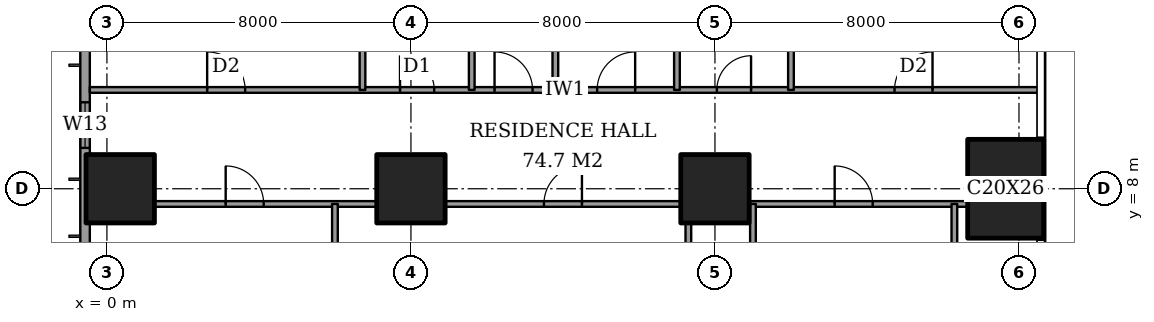
"""IFC4 building model, lengths in metres.
Left out: names, types, materials, properties, quantities, classifications, styles, units other than length and angle.
Written with IfcOpenShell. Run it as: python <this file> out.ifc"""

import sys

from ifc_helpers import new_model, si_unit, direction, frame, frame_2d, origin, origin_2d, place, context, subcontext, project, spatial, rectangle, extrude, element, fill, save


model = new_model("IFC4")
c1 = context("Model", 3, precision=1e-05, world=origin(), true_north=direction((0.0, 1.0)))
c2 = subcontext(c1, "Body", "Model", "MODEL_VIEW")
j1 = project(units=[si_unit("LENGTHUNIT", "METRE"), si_unit("PLANEANGLEUNIT", "RADIAN")], contexts=[c1])
p1 = place(None, origin())
s1 = spatial("IfcSite", under=j1, at=p1, CompositionType="ELEMENT")
p2 = place(p1, origin())
s2 = spatial("IfcBuilding", under=s1, at=p2, CompositionType="ELEMENT")
p3 = place(p2, frame((0.0, 0.0, 185.8)))
s3 = spatial("IfcBuildingStorey", under=s2, at=p3, CompositionType="ELEMENT", Elevation=185.8)
for number, where, z_axis, x_axis in (
    (1, (0.35, 8.0, 0.0), (0.0, 0.0, 1.0), (1.0, 0.0, 0.0)),
    (2, (8.0, 8.0, 0.0), (0.0, 0.0, 1.0), (1.0, 0.0, 0.0)),
    (3, (16.0, 8.0, 0.0), (0.0, 0.0, 1.0), (1.0, 0.0, 0.0)),
):
    element("IfcColumn", number, at=place(p3, frame(where, z_axis=z_axis, x_axis=x_axis)), inside=s3, PredefinedType="COLUMN", context=c2, shape_type="SweptSolid", body=[
        extrude(rectangle(XDim=1.8, YDim=1.8, at=origin_2d()), origin(), (0.0, 0.0, 1.0), 3.6),
    ])
p4 = place(p3, frame((23.65, 8.0, 0.0), z_axis=(0.0, 0.0, 1.0), x_axis=(1.0, 0.0, 0.0)))
e4 = element("IfcColumn", 4, at=p4, inside=s3, PredefinedType="COLUMN", context=c2, shape_type="SweptSolid", body=[
    extrude(rectangle(XDim=2.0, YDim=2.6, at=origin_2d()), origin(), (0.0, 0.0, 1.0), 3.6),
])
p5 = place(p3, frame((-0.575, 44.825, 0.0), z_axis=(0.0, 0.0, 1.0), x_axis=(0.0, -1.0, 0.0)))
e5 = element("IfcWall", 5, at=p5, inside=s3, PredefinedType="SOLIDWALL", context=c2, shape_type="SweptSolid", body=[
    extrude(rectangle(XDim=41.65, YDim=0.25, at=frame_2d((20.825, 0.0))), origin(), (0.0, 0.0, 1.0), 3.6),
])
p6 = place(p5, frame((0.825, 0.0, 0.2)))
e6 = element("IfcOpeningElement", 6, at=p6, cuts=e5, PredefinedType="OPENING", context=c2, shape_type="SweptSolid", body=[
    extrude(rectangle(XDim=2.4, YDim=2.4, at=frame_2d((1.2, 1.2))), frame((0.0, 0.135, 0.0), z_axis=(0.0, -1.0, 0.0), x_axis=(1.0, 0.0, 0.0)), (0.0, 0.0, 1.0), 0.27),
])
p7 = place(p5, frame((6.05, 0.0, 0.2)))
e7 = element("IfcOpeningElement", 7, at=p7, cuts=e5, PredefinedType="OPENING", context=c2, shape_type="SweptSolid", body=[
    extrude(rectangle(XDim=1.2, YDim=2.4, at=frame_2d((0.6, 1.2))), frame((0.0, 0.135, 0.0), z_axis=(0.0, -1.0, 0.0), x_axis=(1.0, 0.0, 0.0)), (0.0, 0.0, 1.0), 0.27),
])
p8 = place(p5, frame((8.475, 0.0, 0.2)))
e8 = element("IfcOpeningElement", 8, at=p8, cuts=e5, PredefinedType="OPENING", context=c2, shape_type="SweptSolid", body=[
    extrude(rectangle(XDim=2.4, YDim=2.4, at=frame_2d((1.2, 1.2))), frame((0.0, 0.135, 0.0), z_axis=(0.0, -1.0, 0.0), x_axis=(1.0, 0.0, 0.0)), (0.0, 0.0, 1.0), 0.27),
])
p9 = place(p5, frame((15.625, 0.0, 0.2)))
e9 = element("IfcOpeningElement", 9, at=p9, cuts=e5, PredefinedType="OPENING", context=c2, shape_type="SweptSolid", body=[
    extrude(rectangle(XDim=2.4, YDim=2.4, at=frame_2d((1.2, 1.2))), frame((0.0, 0.135, 0.0), z_axis=(0.0, -1.0, 0.0), x_axis=(1.0, 0.0, 0.0)), (0.0, 0.0, 1.0), 0.27),
])
p10 = place(p5, frame((23.625, 0.0, 0.2)))
e10 = element("IfcOpeningElement", 10, at=p10, cuts=e5, PredefinedType="OPENING", context=c2, shape_type="SweptSolid", body=[
    extrude(rectangle(XDim=2.4, YDim=2.4, at=frame_2d((1.2, 1.2))), frame((0.0, 0.135, 0.0), z_axis=(0.0, -1.0, 0.0), x_axis=(1.0, 0.0, 0.0)), (0.0, 0.0, 1.0), 0.27),
])
p11 = place(p5, frame((30.775, 0.0, 0.2)))
e11 = element("IfcOpeningElement", 11, at=p11, cuts=e5, PredefinedType="OPENING", context=c2, shape_type="SweptSolid", body=[
    extrude(rectangle(XDim=2.4, YDim=2.4, at=frame_2d((1.2, 1.2))), frame((0.0, 0.135, 0.0), z_axis=(0.0, -1.0, 0.0), x_axis=(1.0, 0.0, 0.0)), (0.0, 0.0, 1.0), 0.27),
])
p12 = place(p5, frame((34.55, 0.0, 0.2)))
e12 = element("IfcOpeningElement", 12, at=p12, cuts=e5, PredefinedType="OPENING", context=c2, shape_type="SweptSolid", body=[
    extrude(rectangle(XDim=1.2, YDim=2.4, at=frame_2d((0.6, 1.2))), frame((0.0, 0.135, 0.0), z_axis=(0.0, -1.0, 0.0), x_axis=(1.0, 0.0, 0.0)), (0.0, 0.0, 1.0), 0.27),
])
p13 = place(p5, frame((38.425, 0.0, 0.2)))
e13 = element("IfcOpeningElement", 13, at=p13, cuts=e5, PredefinedType="OPENING", context=c2, shape_type="SweptSolid", body=[
    extrude(rectangle(XDim=2.4, YDim=2.4, at=frame_2d((1.2, 1.2))), frame((0.0, 0.135, 0.0), z_axis=(0.0, -1.0, 0.0), x_axis=(1.0, 0.0, 0.0)), (0.0, 0.0, 1.0), 0.27),
])
p14 = place(p3, frame((1.25, 7.6, 0.0), z_axis=(0.0, 0.0, 1.0), x_axis=(1.0, 0.0, 0.0)))
e14 = element("IfcWall", 14, at=p14, inside=s3, PredefinedType="PARTITIONING", context=c2, shape_type="SweptSolid", body=[
    extrude(rectangle(XDim=5.85, YDim=0.15, at=frame_2d((2.925, 0.0))), origin(), (0.0, 0.0, 1.0), 3.35),
])
p15 = place(p14, frame((1.875, 0.0, 0.0)))
e15 = element("IfcOpeningElement", 15, at=p15, cuts=e14, PredefinedType="OPENING", context=c2, shape_type="SweptSolid", body=[
    extrude(rectangle(XDim=1.0, YDim=2.1, at=frame_2d((0.5, 1.05))), frame((0.0, 0.085, 0.0), z_axis=(0.0, -1.0, 0.0), x_axis=(1.0, 0.0, 0.0)), (0.0, 0.0, 1.0), 0.17),
])
p16 = place(p3, frame((8.9, 7.6, 0.0), z_axis=(0.0, 0.0, 1.0), x_axis=(1.0, 0.0, 0.0)))
e16 = element("IfcWall", 16, at=p16, inside=s3, PredefinedType="PARTITIONING", context=c2, shape_type="SweptSolid", body=[
    extrude(rectangle(XDim=6.2, YDim=0.15, at=frame_2d((3.1, 0.0))), origin(), (0.0, 0.0, 1.0), 3.35),
])
p17 = place(p16, frame((2.6, 0.0, 0.0)))
e17 = element("IfcOpeningElement", 17, at=p17, cuts=e16, PredefinedType="OPENING", context=c2, shape_type="SweptSolid", body=[
    extrude(rectangle(XDim=1.0, YDim=2.1, at=frame_2d((0.5, 1.05))), frame((0.0, 0.085, 0.0), z_axis=(0.0, -1.0, 0.0), x_axis=(1.0, 0.0, 0.0)), (0.0, 0.0, 1.0), 0.17),
])
p18 = place(p3, frame((16.9, 7.6, 0.0), z_axis=(0.0, 0.0, 1.0), x_axis=(1.0, 0.0, 0.0)))
e18 = element("IfcWall", 18, at=p18, inside=s3, PredefinedType="PARTITIONING", context=c2, shape_type="SweptSolid", body=[
    extrude(rectangle(XDim=5.75, YDim=0.15, at=frame_2d((2.875, 0.0))), origin(), (0.0, 0.0, 1.0), 3.35),
])
p19 = place(p18, frame((2.25, 0.0, 0.0)))
e19 = element("IfcOpeningElement", 19, at=p19, cuts=e18, PredefinedType="OPENING", context=c2, shape_type="SweptSolid", body=[
    extrude(rectangle(XDim=1.0, YDim=2.1, at=frame_2d((0.5, 1.05))), frame((0.0, 0.085, 0.0), z_axis=(0.0, -1.0, 0.0), x_axis=(1.0, 0.0, 0.0)), (0.0, 0.0, 1.0), 0.17),
])
p20 = place(p3, frame((-0.45, 10.6, 0.0), z_axis=(0.0, 0.0, 1.0), x_axis=(1.0, 0.0, 0.0)))
e20 = element("IfcWall", 20, at=p20, inside=s3, PredefinedType="PARTITIONING", context=c2, shape_type="SweptSolid", body=[
    extrude(rectangle(XDim=25.011, YDim=0.15, at=frame_2d((12.505, 0.0))), origin(), (0.0, 0.0, 1.0), 3.35),
])
p21 = place(p20, frame((10.65, 0.0, 0.0)))
e21 = element("IfcOpeningElement", 21, at=p21, cuts=e20, PredefinedType="OPENING", context=c2, shape_type="SweptSolid", body=[
    extrude(rectangle(XDim=1.0, YDim=2.1, at=frame_2d((0.5, 1.05))), frame((0.0, 0.085, 0.0), z_axis=(0.0, -1.0, 0.0), x_axis=(1.0, 0.0, 0.0)), (0.0, 0.0, 1.0), 0.17),
])
p22 = place(p20, frame((3.087, 0.0, 0.0)))
e22 = element("IfcOpeningElement", 22, at=p22, cuts=e20, PredefinedType="OPENING", context=c2, shape_type="SweptSolid", body=[
    extrude(rectangle(XDim=1.0, YDim=2.1, at=frame_2d((0.5, 1.05))), frame((0.0, 0.085, 0.0), z_axis=(0.0, -1.0, 0.0), x_axis=(1.0, 0.0, 0.0)), (0.0, 0.0, 1.0), 0.17),
])
p23 = place(p20, frame((8.163, 0.0, 0.0)))
e23 = element("IfcOpeningElement", 23, at=p23, cuts=e20, PredefinedType="OPENING", context=c2, shape_type="SweptSolid", body=[
    extrude(rectangle(XDim=0.9, YDim=2.1, at=frame_2d((0.45, 1.05))), frame((0.0, 0.085, 0.0), z_axis=(0.0, -1.0, 0.0), x_axis=(1.0, 0.0, 0.0)), (0.0, 0.0, 1.0), 0.17),
])
p24 = place(p20, frame((13.35, 0.0, 0.0)))
e24 = element("IfcOpeningElement", 24, at=p24, cuts=e20, PredefinedType="OPENING", context=c2, shape_type="SweptSolid", body=[
    extrude(rectangle(XDim=1.0, YDim=2.1, at=frame_2d((0.5, 1.05))), frame((0.0, 0.085, 0.0), z_axis=(0.0, -1.0, 0.0), x_axis=(1.0, 0.0, 0.0)), (0.0, 0.0, 1.0), 0.17),
])
p25 = place(p20, frame((16.5, 0.0, 0.0)))
e25 = element("IfcOpeningElement", 25, at=p25, cuts=e20, PredefinedType="OPENING", context=c2, shape_type="SweptSolid", body=[
    extrude(rectangle(XDim=0.9, YDim=2.1, at=frame_2d((0.45, 1.05))), frame((0.0, 0.085, 0.0), z_axis=(0.0, -1.0, 0.0), x_axis=(1.0, 0.0, 0.0)), (0.0, 0.0, 1.0), 0.17),
])
p26 = place(p20, frame((21.175, 0.0, 0.0)))
e26 = element("IfcOpeningElement", 26, at=p26, cuts=e20, PredefinedType="OPENING", context=c2, shape_type="SweptSolid", body=[
    extrude(rectangle(XDim=1.0, YDim=2.1, at=frame_2d((0.5, 1.05))), frame((0.0, 0.085, 0.0), z_axis=(0.0, -1.0, 0.0), x_axis=(1.0, 0.0, 0.0)), (0.0, 0.0, 1.0), 0.17),
])
p27 = place(p3, frame((6.0, -0.45, 0.0), z_axis=(0.0, 0.0, 1.0), x_axis=(0.0, 1.0, 0.0)))
e27 = element("IfcWall", 27, at=p27, inside=s3, PredefinedType="PARTITIONING", context=c2, shape_type="SweptSolid", body=[
    extrude(rectangle(XDim=8.05, YDim=0.15, at=frame_2d((4.025, 0.0))), origin(), (0.0, 0.0, 1.0), 3.35),
])
p28 = place(p3, frame((6.725, 10.6, 0.0), z_axis=(0.0, 0.0, 1.0), x_axis=(0.0, 1.0, 0.0)))
e28 = element("IfcWall", 28, at=p28, inside=s3, PredefinedType="PARTITIONING", context=c2, shape_type="SweptSolid", body=[
    extrude(rectangle(XDim=4.2, YDim=0.15, at=frame_2d((2.1, 0.0))), origin(), (0.0, 0.0, 1.0), 3.35),
])
p29 = place(p3, frame((9.6, 10.6, 0.0), z_axis=(0.0, 0.0, 1.0), x_axis=(0.0, 1.0, 0.0)))
e29 = element("IfcWall", 29, at=p29, inside=s3, PredefinedType="PARTITIONING", context=c2, shape_type="SweptSolid", body=[
    extrude(rectangle(XDim=11.0, YDim=0.15, at=frame_2d((5.5, 0.0))), origin(), (0.0, 0.0, 1.0), 3.35),
])
p30 = place(p29, frame((8.7, 0.0, 0.0)))
e30 = element("IfcOpeningElement", 30, at=p30, cuts=e29, PredefinedType="OPENING", context=c2, shape_type="SweptSolid", body=[
    extrude(rectangle(XDim=1.0, YDim=2.1, at=frame_2d((0.5, 1.05))), frame((0.0, 0.085, 0.0), z_axis=(0.0, -1.0, 0.0), x_axis=(1.0, 0.0, 0.0)), (0.0, 0.0, 1.0), 0.17),
])
p31 = place(p3, frame((11.8, 10.6, 0.0), z_axis=(0.0, 0.0, 1.0), x_axis=(0.0, 1.0, 0.0)))
e31 = element("IfcWall", 31, at=p31, inside=s3, PredefinedType="PARTITIONING", context=c2, shape_type="SweptSolid", body=[
    extrude(rectangle(XDim=7.4, YDim=0.15, at=frame_2d((3.7, 0.0))), origin(), (0.0, 0.0, 1.0), 3.35),
])
p32 = place(p3, frame((15.0, 10.6, 0.0), z_axis=(0.0, 0.0, 1.0), x_axis=(0.0, 1.0, 0.0)))
e32 = element("IfcWall", 32, at=p32, inside=s3, PredefinedType="PARTITIONING", context=c2, shape_type="SweptSolid", body=[
    extrude(rectangle(XDim=4.2, YDim=0.15, at=frame_2d((2.1, 0.0))), origin(), (0.0, 0.0, 1.0), 3.35),
])
p33 = place(p3, frame((15.3, 1.25, 0.0), z_axis=(0.0, 0.0, 1.0), x_axis=(0.0, 1.0, 0.0)))
e33 = element("IfcWall", 33, at=p33, inside=s3, PredefinedType="PARTITIONING", context=c2, shape_type="SweptSolid", body=[
    extrude(rectangle(XDim=5.85, YDim=0.15, at=frame_2d((2.925, 0.0))), origin(), (0.0, 0.0, 1.0), 3.35),
])
p34 = place(p33, frame((2.475, 0.0, 0.0)))
e34 = element("IfcOpeningElement", 34, at=p34, cuts=e33, PredefinedType="OPENING", context=c2, shape_type="SweptSolid", body=[
    extrude(rectangle(XDim=0.9, YDim=2.1, at=frame_2d((0.45, 1.05))), frame((0.0, 0.085, 0.0), z_axis=(0.0, -1.0, 0.0), x_axis=(1.0, 0.0, 0.0)), (0.0, 0.0, 1.0), 0.17),
])
p35 = place(p3, frame((17.0, -0.45, 0.0), z_axis=(0.0, 0.0, 1.0), x_axis=(0.0, 1.0, 0.0)))
e35 = element("IfcWall", 35, at=p35, inside=s3, PredefinedType="PARTITIONING", context=c2, shape_type="SweptSolid", body=[
    extrude(rectangle(XDim=8.05, YDim=0.15, at=frame_2d((4.025, 0.0))), origin(), (0.0, 0.0, 1.0), 3.35),
])
p36 = place(p3, frame((18.0, 10.6, 0.0), z_axis=(0.0, 0.0, 1.0), x_axis=(0.0, 1.0, 0.0)))
e36 = element("IfcWall", 36, at=p36, inside=s3, PredefinedType="PARTITIONING", context=c2, shape_type="SweptSolid", body=[
    extrude(rectangle(XDim=7.4, YDim=0.15, at=frame_2d((3.7, 0.0))), origin(), (0.0, 0.0, 1.0), 3.35),
])
p37 = place(p3, frame((22.3, -0.45, 0.0), z_axis=(0.0, 0.0, 1.0), x_axis=(0.0, 1.0, 0.0)))
e37 = element("IfcWall", 37, at=p37, inside=s3, PredefinedType="PARTITIONING", context=c2, shape_type="SweptSolid", body=[
    extrude(rectangle(XDim=8.05, YDim=0.15, at=frame_2d((4.025, 0.0))), origin(), (0.0, 0.0, 1.0), 3.35),
])
p38 = place(p37, frame((3.575, 0.0, 0.0)))
e38 = element("IfcOpeningElement", 38, at=p38, cuts=e37, PredefinedType="OPENING", context=c2, shape_type="SweptSolid", body=[
    extrude(rectangle(XDim=0.9, YDim=2.1, at=frame_2d((0.45, 1.05))), frame((0.0, 0.085, 0.0), z_axis=(0.0, -1.0, 0.0), x_axis=(1.0, 0.0, 0.0)), (0.0, 0.0, 1.0), 0.17),
])
p39 = place(p12, origin())
e39 = element("IfcWindow", 39, at=p39, inside=s3, PartitioningType="SINGLE_PANEL", PredefinedType="WINDOW", context=c2, shape_type="SweptSolid", body=[
    extrude(rectangle(XDim=1.2, YDim=2.4, at=frame_2d((0.6, 1.2))), frame((0.0, 0.03, 0.0), z_axis=(0.0, -1.0, 0.0), x_axis=(1.0, 0.0, 0.0)), (0.0, 0.0, 1.0), 0.06),
])
fill(e12, e39)
p40 = place(p15, origin())
e40 = element("IfcDoor", 40, at=p40, inside=s3, OperationType="SINGLE_SWING_RIGHT", PredefinedType="DOOR", context=c2, shape_type="SweptSolid", body=[
    extrude(rectangle(XDim=1.0, YDim=2.1, at=frame_2d((0.5, 1.05))), frame((0.0, 0.025, 0.0), z_axis=(0.0, -1.0, 0.0), x_axis=(1.0, 0.0, 0.0)), (0.0, 0.0, 1.0), 0.05),
])
fill(e15, e40)
p41 = place(p17, origin())
e41 = element("IfcDoor", 41, at=p41, inside=s3, OperationType="SINGLE_SWING_LEFT", PredefinedType="DOOR", context=c2, shape_type="SweptSolid", body=[
    extrude(rectangle(XDim=1.0, YDim=2.1, at=frame_2d((0.5, 1.05))), frame((0.0, 0.025, 0.0), z_axis=(0.0, -1.0, 0.0), x_axis=(1.0, 0.0, 0.0)), (0.0, 0.0, 1.0), 0.05),
])
fill(e17, e41)
p42 = place(p19, origin())
e42 = element("IfcDoor", 42, at=p42, inside=s3, OperationType="SINGLE_SWING_RIGHT", PredefinedType="DOOR", context=c2, shape_type="SweptSolid", body=[
    extrude(rectangle(XDim=1.0, YDim=2.1, at=frame_2d((0.5, 1.05))), frame((0.0, 0.025, 0.0), z_axis=(0.0, -1.0, 0.0), x_axis=(1.0, 0.0, 0.0)), (0.0, 0.0, 1.0), 0.05),
])
fill(e19, e42)
p43 = place(p21, origin())
e43 = element("IfcDoor", 43, at=p43, inside=s3, OperationType="SINGLE_SWING_RIGHT", PredefinedType="DOOR", context=c2, shape_type="SweptSolid", body=[
    extrude(rectangle(XDim=1.0, YDim=2.1, at=frame_2d((0.5, 1.05))), frame((0.0, 0.025, 0.0), z_axis=(0.0, -1.0, 0.0), x_axis=(1.0, 0.0, 0.0)), (0.0, 0.0, 1.0), 0.05),
])
fill(e21, e43)
p44 = place(p22, origin())
e44 = element("IfcDoor", 44, at=p44, inside=s3, OperationType="SINGLE_SWING_RIGHT", PredefinedType="DOOR", context=c2, shape_type="SweptSolid", body=[
    extrude(rectangle(XDim=1.0, YDim=2.1, at=frame_2d((0.5, 1.05))), frame((0.0, 0.025, 0.0), z_axis=(0.0, -1.0, 0.0), x_axis=(1.0, 0.0, 0.0)), (0.0, 0.0, 1.0), 0.05),
])
fill(e22, e44)
p45 = place(p23, origin())
e45 = element("IfcDoor", 45, at=p45, inside=s3, OperationType="SINGLE_SWING_RIGHT", PredefinedType="DOOR", context=c2, shape_type="SweptSolid", body=[
    extrude(rectangle(XDim=0.9, YDim=2.1, at=frame_2d((0.45, 1.05))), frame((0.0, 0.025, 0.0), z_axis=(0.0, -1.0, 0.0), x_axis=(1.0, 0.0, 0.0)), (0.0, 0.0, 1.0), 0.05),
])
fill(e23, e45)
p46 = place(p24, origin())
e46 = element("IfcDoor", 46, at=p46, inside=s3, OperationType="SINGLE_SWING_LEFT", PredefinedType="DOOR", context=c2, shape_type="SweptSolid", body=[
    extrude(rectangle(XDim=1.0, YDim=2.1, at=frame_2d((0.5, 1.05))), frame((0.0, 0.025, 0.0), z_axis=(0.0, -1.0, 0.0), x_axis=(1.0, 0.0, 0.0)), (0.0, 0.0, 1.0), 0.05),
])
fill(e24, e46)
p47 = place(p25, origin())
e47 = element("IfcDoor", 47, at=p47, inside=s3, OperationType="SINGLE_SWING_LEFT", PredefinedType="DOOR", context=c2, shape_type="SweptSolid", body=[
    extrude(rectangle(XDim=0.9, YDim=2.1, at=frame_2d((0.45, 1.05))), frame((0.0, 0.025, 0.0), z_axis=(0.0, -1.0, 0.0), x_axis=(1.0, 0.0, 0.0)), (0.0, 0.0, 1.0), 0.05),
])
fill(e25, e47)
p48 = place(p26, origin())
e48 = element("IfcDoor", 48, at=p48, inside=s3, OperationType="SINGLE_SWING_LEFT", PredefinedType="DOOR", context=c2, shape_type="SweptSolid", body=[
    extrude(rectangle(XDim=1.0, YDim=2.1, at=frame_2d((0.5, 1.05))), frame((0.0, 0.025, 0.0), z_axis=(0.0, -1.0, 0.0), x_axis=(1.0, 0.0, 0.0)), (0.0, 0.0, 1.0), 0.05),
])
fill(e26, e48)
save(model, sys.argv[1])
